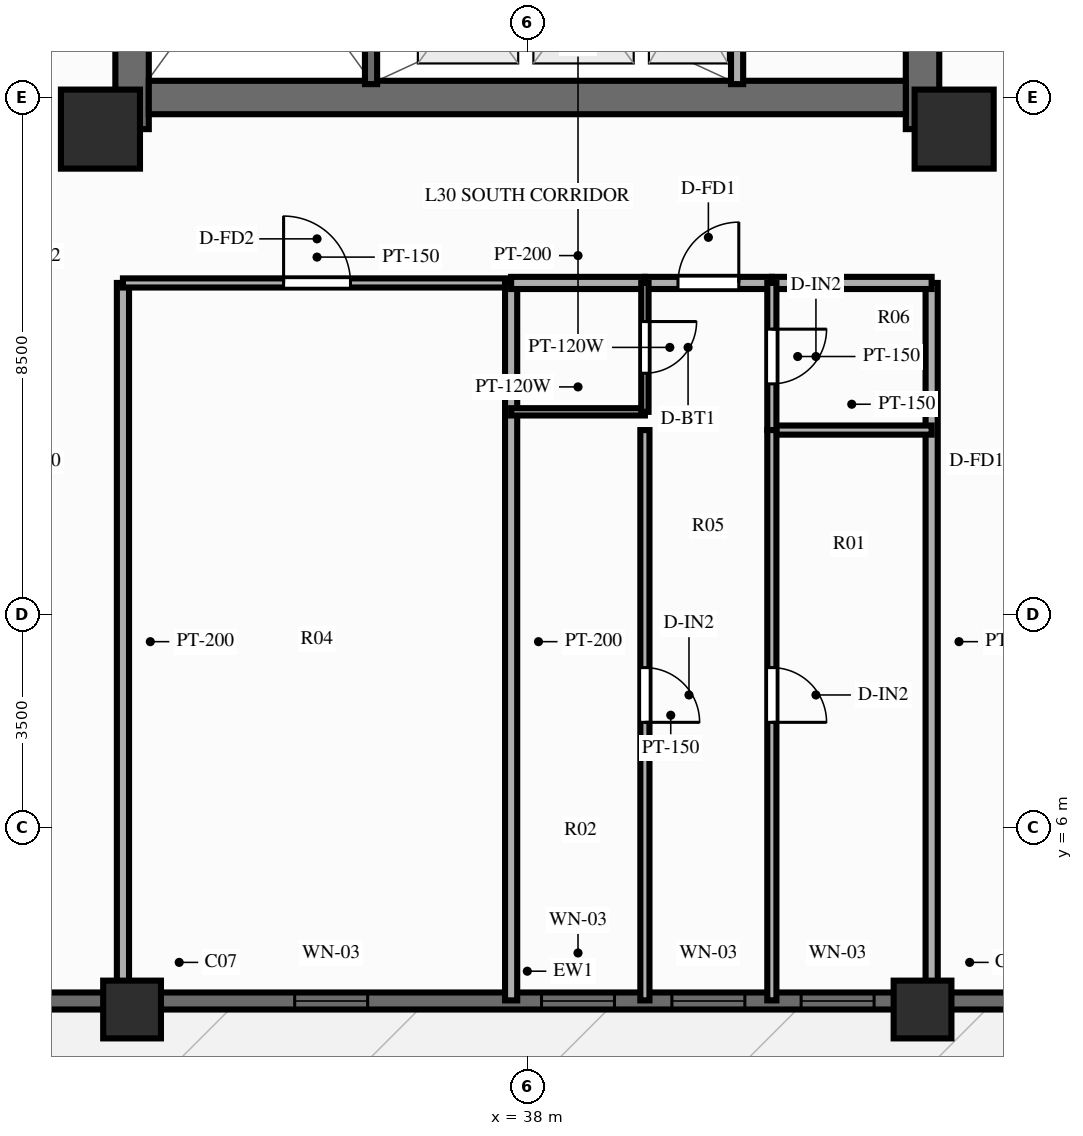
"""IFC4 building model, lengths in metres.
Left out: names, types, materials, properties, quantities, classifications, styles, units other than length and angle.
Written with IfcOpenShell. Run it as: python <this file> out.ifc"""

import sys

from ifc_helpers import new_model, si_unit, direction, frame, frame_2d, origin, origin_2d, place, context, subcontext, project, spatial, rectangle, extrude, source, transform, mapped, element, fill, save


model = new_model("IFC4")
c1 = context("Model", 3, precision=1e-05, world=origin(), true_north=direction((0.0, 1.0)))
c2 = subcontext(c1, "Body", "Model", "MODEL_VIEW")
j1 = project(units=[si_unit("LENGTHUNIT", "METRE"), si_unit("PLANEANGLEUNIT", "RADIAN")], contexts=[c1])
p1 = place(None, origin())
s1 = spatial("IfcSite", under=j1, at=p1, CompositionType="ELEMENT")
p2 = place(p1, origin())
s2 = spatial("IfcBuilding", under=s1, at=p2, CompositionType="ELEMENT")
p3 = place(p2, frame((0.0, 0.0, 95.85)))
s3 = spatial("IfcBuildingStorey", under=s2, at=p3, CompositionType="ELEMENT", Elevation=95.85)
p4 = place(p3, frame((31.5, 17.48, 0.0), z_axis=(0.0, 0.0, 1.0), x_axis=(0.0, 1.0, 0.0)))
e1 = element("IfcWall", 1, at=p4, inside=s3, PredefinedType="SHEAR", context=c2, shape_type="SweptSolid", body=[
    extrude(rectangle(XDim=19.04, YDim=0.55, at=frame_2d((9.52, 0.0))), origin(), (0.0, 0.0, 1.0), 3.0),
])
p5 = place(p4, frame((6.32, 0.0, 0.0)))
e2 = element("IfcOpeningElement", 2, at=p5, cuts=e1, PredefinedType="OPENING", context=c2, shape_type="SweptSolid", body=[
    extrude(rectangle(XDim=1.1, YDim=2.15, at=frame_2d((0.55, 1.075))), frame((0.0, 0.287, 0.0), z_axis=(0.0, -1.0, 0.0), x_axis=(1.0, 0.0, 0.0)), (0.0, 0.0, 1.0), 0.574),
])
p6 = place(p3, frame((44.5, 17.48, 0.0), z_axis=(0.0, 0.0, 1.0), x_axis=(0.0, 1.0, 0.0)))
e3 = element("IfcWall", 3, at=p6, inside=s3, PredefinedType="SHEAR", context=c2, shape_type="SweptSolid", body=[
    extrude(rectangle(XDim=19.04, YDim=0.55, at=frame_2d((9.52, 0.0))), origin(), (0.0, 0.0, 1.0), 3.0),
])
p7 = place(p6, frame((12.67, 0.0, 0.0), z_axis=(0.0, 0.0, 1.0), x_axis=(-1.0, 0.0, 0.0)))
e4 = element("IfcOpeningElement", 4, at=p7, cuts=e3, PredefinedType="OPENING", context=c2, shape_type="SweptSolid", body=[
    extrude(rectangle(XDim=1.1, YDim=2.15, at=frame_2d((0.55, 1.075))), frame((0.0, 0.287, 0.0), z_axis=(0.0, -1.0, 0.0), x_axis=(1.0, 0.0, 0.0)), (0.0, 0.0, 1.0), 0.574),
])
p8 = place(p3, frame((31.775, 18.0, 0.0), z_axis=(0.0, 0.0, 1.0), x_axis=(1.0, 0.0, 0.0)))
e5 = element("IfcWall", 5, at=p8, inside=s3, PredefinedType="SHEAR", context=c2, shape_type="SweptSolid", body=[
    extrude(rectangle(XDim=12.45, YDim=0.55, at=frame_2d((6.225, 0.0))), origin(), (0.0, 0.0, 1.0), 3.0),
])
m1 = source(origin(), c2, "Body", "SweptSolid", [
    extrude(rectangle(XDim=1.3, YDim=1.3, at=origin_2d()), origin(), (0.0, 0.0, 1.0), 3.0),
])
for number, where, z_axis, x_axis in (
    (6, (30.98, 17.48, 0.0), (0.0, 0.0, 1.0), (1.0, 0.0, 0.0)),
    (7, (45.02, 17.48, 0.0), (0.0, 0.0, 1.0), (1.0, 0.0, 0.0)),
):
    element("IfcColumn", number, at=place(p3, frame(where, z_axis=z_axis, x_axis=x_axis)), inside=s3, PredefinedType="COLUMN", context=c2, shape_type="MappedRepresentation", body=[
        mapped(m1, transform((0.0, 0.0, 0.0), scale=1.0)),
    ])
m2 = source(origin(), c2, "Body", "SweptSolid", [
    extrude(rectangle(XDim=0.95, YDim=0.95, at=origin_2d()), origin(), (0.0, 0.0, 1.0), 3.0),
])
for number, where, z_axis, x_axis in (
    (8, (31.5, 3.0, 0.0), (0.0, 0.0, 1.0), (1.0, 0.0, 0.0)),
    (9, (44.5, 3.0, 0.0), (0.0, 0.0, 1.0), (1.0, 0.0, 0.0)),
):
    element("IfcColumn", number, at=place(p3, frame(where, z_axis=z_axis, x_axis=x_axis)), inside=s3, PredefinedType="COLUMN", context=c2, shape_type="MappedRepresentation", body=[
        mapped(m2, transform((0.0, 0.0, 0.0), scale=1.0)),
    ])
p9 = place(p3, frame((16.2, 3.14, 0.0), z_axis=(0.0, 0.0, 1.0), x_axis=(1.0, 0.0, 0.0)))
e10 = element("IfcWall", 10, at=p9, inside=s3, PredefinedType="SOLIDWALL", context=c2, shape_type="SweptSolid", body=[
    extrude(rectangle(XDim=43.6, YDim=0.28, at=frame_2d((21.8, 0.0))), origin(), (0.0, 0.0, 1.0), 2.28),
])
p10 = place(p9, frame((8.2, 0.0, 0.0), z_axis=(0.0, 0.0, 1.0), x_axis=(-1.0, 0.0, 0.0)))
e11 = element("IfcOpeningElement", 11, at=p10, cuts=e10, PredefinedType="OPENING", context=c2, shape_type="SweptSolid", body=[
    extrude(rectangle(XDim=1.1, YDim=2.15, at=frame_2d((0.55, 1.075))), frame((0.0, 0.152, 0.0), z_axis=(0.0, -1.0, 0.0), x_axis=(1.0, 0.0, 0.0)), (0.0, 0.0, 1.0), 0.304),
])
p11 = place(p9, frame((17.975, 0.0, 0.25)))
e12 = element("IfcOpeningElement", 12, at=p11, cuts=e10, PredefinedType="OPENING", context=c2, shape_type="SweptSolid", body=[
    extrude(rectangle(XDim=1.2, YDim=1.5, at=frame_2d((0.6, 0.75))), frame((0.0, 0.152, 0.0), z_axis=(0.0, -1.0, 0.0), x_axis=(1.0, 0.0, 0.0)), (0.0, 0.0, 1.0), 0.304),
])
p12 = place(p9, frame((22.034, 0.0, 0.25)))
e13 = element("IfcOpeningElement", 13, at=p12, cuts=e10, PredefinedType="OPENING", context=c2, shape_type="SweptSolid", body=[
    extrude(rectangle(XDim=1.2, YDim=1.5, at=frame_2d((0.6, 0.75))), frame((0.0, 0.152, 0.0), z_axis=(0.0, -1.0, 0.0), x_axis=(1.0, 0.0, 0.0)), (0.0, 0.0, 1.0), 0.304),
])
p13 = place(p9, frame((24.178, 0.0, 0.25)))
e14 = element("IfcOpeningElement", 14, at=p13, cuts=e10, PredefinedType="OPENING", context=c2, shape_type="SweptSolid", body=[
    extrude(rectangle(XDim=1.2, YDim=1.5, at=frame_2d((0.6, 0.75))), frame((0.0, 0.152, 0.0), z_axis=(0.0, -1.0, 0.0), x_axis=(1.0, 0.0, 0.0)), (0.0, 0.0, 1.0), 0.304),
])
p14 = place(p9, frame((26.303, 0.0, 0.25)))
e15 = element("IfcOpeningElement", 15, at=p14, cuts=e10, PredefinedType="OPENING", context=c2, shape_type="SweptSolid", body=[
    extrude(rectangle(XDim=1.2, YDim=1.5, at=frame_2d((0.6, 0.75))), frame((0.0, 0.152, 0.0), z_axis=(0.0, -1.0, 0.0), x_axis=(1.0, 0.0, 0.0)), (0.0, 0.0, 1.0), 0.304),
])
p15 = place(p9, frame((35.35, 0.0, 0.25)))
e16 = element("IfcOpeningElement", 16, at=p15, cuts=e10, PredefinedType="OPENING", context=c2, shape_type="SweptSolid", body=[
    extrude(rectangle(XDim=1.2, YDim=1.5, at=frame_2d((0.6, 0.75))), frame((0.0, 0.152, 0.0), z_axis=(0.0, -1.0, 0.0), x_axis=(1.0, 0.0, 0.0)), (0.0, 0.0, 1.0), 0.304),
])
p16 = place(p3, frame((41.45, 18.22, 0.0), z_axis=(0.0, 0.0, 1.0), x_axis=(0.0, 1.0, 0.0)))
e17 = element("IfcWall", 17, at=p16, inside=s3, PredefinedType="PARTITIONING", context=c2, shape_type="SweptSolid", body=[
    extrude(rectangle(XDim=2.96, YDim=0.2, at=frame_2d((1.48, 0.0))), origin(), (0.0, 0.0, 1.0), 2.79),
])
p17 = place(p3, frame((35.43, 18.22, 0.0), z_axis=(0.0, 0.0, 1.0), x_axis=(0.0, 1.0, 0.0)))
e18 = element("IfcWall", 18, at=p17, inside=s3, PredefinedType="SOLIDWALL", context=c2, shape_type="SweptSolid", body=[
    extrude(rectangle(XDim=7.22, YDim=0.2, at=frame_2d((3.61, 0.0))), origin(), (0.0, 0.0, 1.0), 2.79),
])
p18 = place(p17, frame((6.68, 0.0, 0.0), z_axis=(0.0, 0.0, 1.0), x_axis=(-1.0, 0.0, 0.0)))
e19 = element("IfcOpeningElement", 19, at=p18, cuts=e18, PredefinedType="OPENING", context=c2, shape_type="SweptSolid", body=[
    extrude(rectangle(XDim=1.1, YDim=2.15, at=frame_2d((0.55, 1.075))), frame((0.0, 0.112, 0.0), z_axis=(0.0, -1.0, 0.0), x_axis=(1.0, 0.0, 0.0)), (0.0, 0.0, 1.0), 0.224),
])
for number, where, z_axis, x_axis in (
    (20, (31.35, 14.95, 0.0), (0.0, 0.0, 1.0), (0.0, -1.0, 0.0)),
    (21, (44.65, 14.95, 0.0), (0.0, 0.0, 1.0), (0.0, -1.0, 0.0)),
):
    element("IfcWall", number, at=place(p3, frame(where, z_axis=z_axis, x_axis=x_axis)), inside=s3, PredefinedType="PARTITIONING", context=c2, shape_type="SweptSolid", body=[
        extrude(rectangle(XDim=11.8, YDim=0.2, at=frame_2d((5.9, 0.0))), origin(), (0.0, 0.0, 1.0), 2.34),
    ])
p19 = place(p3, frame((31.35, 14.95, 0.0), z_axis=(0.0, 0.0, 1.0), x_axis=(1.0, 0.0, 0.0)))
e22 = element("IfcWall", 22, at=p19, inside=s3, PredefinedType="PARTITIONING", context=c2, shape_type="SweptSolid", body=[
    extrude(rectangle(XDim=6.384, YDim=0.15, at=frame_2d((3.192, 0.0))), origin(), (0.0, 0.0, 1.0), 2.79),
])
p20 = place(p19, frame((2.642, 0.0, 0.0)))
e23 = element("IfcOpeningElement", 23, at=p20, cuts=e22, PredefinedType="OPENING", context=c2, shape_type="SweptSolid", body=[
    extrude(rectangle(XDim=1.1, YDim=2.15, at=frame_2d((0.55, 1.075))), frame((0.0, 0.087, 0.0), z_axis=(0.0, -1.0, 0.0), x_axis=(1.0, 0.0, 0.0)), (0.0, 0.0, 1.0), 0.174),
])
p21 = place(p3, frame((37.734, 14.95, 0.0), z_axis=(0.0, 0.0, 1.0), x_axis=(0.0, -1.0, 0.0)))
e24 = element("IfcWall", 24, at=p21, inside=s3, PredefinedType="PARTITIONING", context=c2, shape_type="SweptSolid", body=[
    extrude(rectangle(XDim=11.8, YDim=0.2, at=frame_2d((5.9, 0.0))), origin(), (0.0, 0.0, 1.0), 2.79),
])
p22 = place(p3, frame((37.734, 14.95, 0.0), z_axis=(0.0, 0.0, 1.0), x_axis=(1.0, 0.0, 0.0)))
e25 = element("IfcWall", 25, at=p22, inside=s3, PredefinedType="PARTITIONING", context=c2, shape_type="SweptSolid", body=[
    extrude(rectangle(XDim=2.2, YDim=0.2, at=frame_2d((1.1, 0.0))), origin(), (0.0, 0.0, 1.0), 2.79),
])
p23 = place(p3, frame((39.934, 14.95, 0.0), z_axis=(0.0, 0.0, 1.0), x_axis=(1.0, 0.0, 0.0)))
e26 = element("IfcWall", 26, at=p23, inside=s3, PredefinedType="PARTITIONING", context=c2, shape_type="SweptSolid", body=[
    extrude(rectangle(XDim=2.088, YDim=0.2, at=frame_2d((1.044, 0.0))), origin(), (0.0, 0.0, 1.0), 2.79),
])
p24 = place(p23, frame((0.544, 0.0, 0.0)))
e27 = element("IfcOpeningElement", 27, at=p24, cuts=e26, PredefinedType="OPENING", context=c2, shape_type="SweptSolid", body=[
    extrude(rectangle(XDim=1.0, YDim=2.15, at=frame_2d((0.5, 1.075))), frame((0.0, 0.112, 0.0), z_axis=(0.0, -1.0, 0.0), x_axis=(1.0, 0.0, 0.0)), (0.0, 0.0, 1.0), 0.224),
])
p25 = place(p3, frame((42.022, 14.95, 0.0), z_axis=(0.0, 0.0, 1.0), x_axis=(1.0, 0.0, 0.0)))
e28 = element("IfcWall", 28, at=p25, inside=s3, PredefinedType="PARTITIONING", context=c2, shape_type="SweptSolid", body=[
    extrude(rectangle(XDim=2.628, YDim=0.2, at=frame_2d((1.314, 0.0))), origin(), (0.0, 0.0, 1.0), 2.79),
])
p26 = place(p3, frame((37.734, 12.83, 0.0), z_axis=(0.0, 0.0, 1.0), x_axis=(1.0, 0.0, 0.0)))
e29 = element("IfcWall", 29, at=p26, inside=s3, PredefinedType="PARTITIONING", context=c2, shape_type="SweptSolid", body=[
    extrude(rectangle(XDim=2.2, YDim=0.12, at=frame_2d((1.1, 0.0))), origin(), (0.0, 0.0, 1.0), 2.79),
])
p27 = place(p3, frame((42.022, 12.53, 0.0), z_axis=(0.0, 0.0, 1.0), x_axis=(1.0, 0.0, 0.0)))
e30 = element("IfcWall", 30, at=p27, inside=s3, PredefinedType="PARTITIONING", context=c2, shape_type="SweptSolid", body=[
    extrude(rectangle(XDim=2.628, YDim=0.15, at=frame_2d((1.314, 0.0))), origin(), (0.0, 0.0, 1.0), 2.79),
])
p28 = place(p3, frame((39.934, 14.95, 0.0), z_axis=(0.0, 0.0, 1.0), x_axis=(0.0, -1.0, 0.0)))
e31 = element("IfcWall", 31, at=p28, inside=s3, PredefinedType="PARTITIONING", context=c2, shape_type="SweptSolid", body=[
    extrude(rectangle(XDim=2.12, YDim=0.12, at=frame_2d((1.06, 0.0))), origin(), (0.0, 0.0, 1.0), 2.79),
])
p29 = place(p28, frame((0.635, 0.0, 0.0)))
e32 = element("IfcOpeningElement", 32, at=p29, cuts=e31, PredefinedType="OPENING", context=c2, shape_type="SweptSolid", body=[
    extrude(rectangle(XDim=0.85, YDim=2.05, at=frame_2d((0.425, 1.025))), frame((0.0, 0.072, 0.0), z_axis=(0.0, -1.0, 0.0), x_axis=(1.0, 0.0, 0.0)), (0.0, 0.0, 1.0), 0.144),
])
p30 = place(p3, frame((39.934, 12.53, 0.0), z_axis=(0.0, 0.0, 1.0), x_axis=(0.0, -1.0, 0.0)))
e33 = element("IfcWall", 33, at=p30, inside=s3, PredefinedType="PARTITIONING", context=c2, shape_type="SweptSolid", body=[
    extrude(rectangle(XDim=9.38, YDim=0.15, at=frame_2d((4.69, 0.0))), origin(), (0.0, 0.0, 1.0), 2.79),
])
p31 = place(p30, frame((3.907, 0.0, 0.0)))
e34 = element("IfcOpeningElement", 34, at=p31, cuts=e33, PredefinedType="OPENING", context=c2, shape_type="SweptSolid", body=[
    extrude(rectangle(XDim=0.9, YDim=2.1, at=frame_2d((0.45, 1.05))), frame((0.0, 0.087, 0.0), z_axis=(0.0, -1.0, 0.0), x_axis=(1.0, 0.0, 0.0)), (0.0, 0.0, 1.0), 0.174),
])
p32 = place(p3, frame((42.022, 14.95, 0.0), z_axis=(0.0, 0.0, 1.0), x_axis=(0.0, -1.0, 0.0)))
e35 = element("IfcWall", 35, at=p32, inside=s3, PredefinedType="PARTITIONING", context=c2, shape_type="SweptSolid", body=[
    extrude(rectangle(XDim=2.42, YDim=0.15, at=frame_2d((1.21, 0.0))), origin(), (0.0, 0.0, 1.0), 2.79),
])
p33 = place(p32, frame((0.76, 0.0, 0.0)))
e36 = element("IfcOpeningElement", 36, at=p33, cuts=e35, PredefinedType="OPENING", context=c2, shape_type="SweptSolid", body=[
    extrude(rectangle(XDim=0.9, YDim=2.1, at=frame_2d((0.45, 1.05))), frame((0.0, 0.087, 0.0), z_axis=(0.0, -1.0, 0.0), x_axis=(1.0, 0.0, 0.0)), (0.0, 0.0, 1.0), 0.174),
])
p34 = place(p3, frame((42.022, 12.53, 0.0), z_axis=(0.0, 0.0, 1.0), x_axis=(0.0, -1.0, 0.0)))
e37 = element("IfcWall", 37, at=p34, inside=s3, PredefinedType="PARTITIONING", context=c2, shape_type="SweptSolid", body=[
    extrude(rectangle(XDim=9.38, YDim=0.15, at=frame_2d((4.69, 0.0))), origin(), (0.0, 0.0, 1.0), 2.79),
])
p35 = place(p34, frame((3.907, 0.0, 0.0)))
e38 = element("IfcOpeningElement", 38, at=p35, cuts=e37, PredefinedType="OPENING", context=c2, shape_type="SweptSolid", body=[
    extrude(rectangle(XDim=0.9, YDim=2.1, at=frame_2d((0.45, 1.05))), frame((0.0, 0.087, 0.0), z_axis=(0.0, -1.0, 0.0), x_axis=(1.0, 0.0, 0.0)), (0.0, 0.0, 1.0), 0.174),
])
m3 = source(origin(), c2, "Body", "SweptSolid", [
    extrude(rectangle(XDim=1.2, YDim=1.5, at=frame_2d((0.6, 0.75))), frame((0.0, 0.03, 0.0), z_axis=(0.0, -1.0, 0.0), x_axis=(1.0, 0.0, 0.0)), (0.0, 0.0, 1.0), 0.06),
])
p36 = place(p11, origin())
e39 = element("IfcWindow", 39, at=p36, inside=s3, PartitioningType="SINGLE_PANEL", PredefinedType="WINDOW", context=c2, shape_type="MappedRepresentation", body=[
    mapped(m3, transform((0.0, 0.0, 0.0), scale=1.0)),
])
fill(e12, e39)
p37 = place(p12, origin())
e40 = element("IfcWindow", 40, at=p37, inside=s3, PartitioningType="SINGLE_PANEL", PredefinedType="WINDOW", context=c2, shape_type="MappedRepresentation", body=[
    mapped(m3, transform((0.0, 0.0, 0.0), scale=1.0)),
])
fill(e13, e40)
p38 = place(p13, origin())
e41 = element("IfcWindow", 41, at=p38, inside=s3, PartitioningType="SINGLE_PANEL", PredefinedType="WINDOW", context=c2, shape_type="MappedRepresentation", body=[
    mapped(m3, transform((0.0, 0.0, 0.0), scale=1.0)),
])
fill(e14, e41)
p39 = place(p14, origin())
e42 = element("IfcWindow", 42, at=p39, inside=s3, PartitioningType="SINGLE_PANEL", PredefinedType="WINDOW", context=c2, shape_type="MappedRepresentation", body=[
    mapped(m3, transform((0.0, 0.0, 0.0), scale=1.0)),
])
fill(e15, e42)
m4 = source(origin(), c2, "Body", "SweptSolid", [
    extrude(rectangle(XDim=1.1, YDim=2.15, at=frame_2d((0.55, 1.075))), frame((0.0, 0.025, 0.0), z_axis=(0.0, -1.0, 0.0), x_axis=(1.0, 0.0, 0.0)), (0.0, 0.0, 1.0), 0.05),
])
p40 = place(p20, origin())
e43 = element("IfcDoor", 43, at=p40, inside=s3, OperationType="SINGLE_SWING_LEFT", PredefinedType="DOOR", context=c2, shape_type="MappedRepresentation", body=[
    mapped(m4, transform((0.0, 0.0, 0.0), scale=1.0)),
])
fill(e23, e43)
m5 = source(origin(), c2, "Body", "SweptSolid", [
    extrude(rectangle(XDim=1.0, YDim=2.15, at=frame_2d((0.5, 1.075))), frame((0.0, 0.025, 0.0), z_axis=(0.0, -1.0, 0.0), x_axis=(1.0, 0.0, 0.0)), (0.0, 0.0, 1.0), 0.05),
])
p41 = place(p24, origin())
e44 = element("IfcDoor", 44, at=p41, inside=s3, OperationType="SINGLE_SWING_RIGHT", PredefinedType="DOOR", context=c2, shape_type="MappedRepresentation", body=[
    mapped(m5, transform((0.0, 0.0, 0.0), scale=1.0)),
])
fill(e27, e44)
m6 = source(origin(), c2, "Body", "SweptSolid", [
    extrude(rectangle(XDim=0.85, YDim=2.05, at=frame_2d((0.425, 1.025))), frame((0.0, 0.025, 0.0), z_axis=(0.0, -1.0, 0.0), x_axis=(1.0, 0.0, 0.0)), (0.0, 0.0, 1.0), 0.05),
])
p42 = place(p29, origin())
e45 = element("IfcDoor", 45, at=p42, inside=s3, OperationType="SINGLE_SWING_LEFT", PredefinedType="DOOR", context=c2, shape_type="MappedRepresentation", body=[
    mapped(m6, transform((0.0, 0.0, 0.0), scale=1.0)),
])
fill(e32, e45)
m7 = source(origin(), c2, "Body", "SweptSolid", [
    extrude(rectangle(XDim=0.9, YDim=2.1, at=frame_2d((0.45, 1.05))), frame((0.0, 0.025, 0.0), z_axis=(0.0, -1.0, 0.0), x_axis=(1.0, 0.0, 0.0)), (0.0, 0.0, 1.0), 0.05),
])
p43 = place(p31, origin())
e46 = element("IfcDoor", 46, at=p43, inside=s3, OperationType="SINGLE_SWING_RIGHT", PredefinedType="DOOR", context=c2, shape_type="MappedRepresentation", body=[
    mapped(m7, transform((0.0, 0.0, 0.0), scale=1.0)),
])
fill(e34, e46)
p44 = place(p33, origin())
e47 = element("IfcDoor", 47, at=p44, inside=s3, OperationType="SINGLE_SWING_LEFT", PredefinedType="DOOR", context=c2, shape_type="MappedRepresentation", body=[
    mapped(m7, transform((0.0, 0.0, 0.0), scale=1.0)),
])
fill(e36, e47)
p45 = place(p35, origin())
e48 = element("IfcDoor", 48, at=p45, inside=s3, OperationType="SINGLE_SWING_RIGHT", PredefinedType="DOOR", context=c2, shape_type="MappedRepresentation", body=[
    mapped(m7, transform((0.0, 0.0, 0.0), scale=1.0)),
])
fill(e38, e48)
save(model, sys.argv[1])
